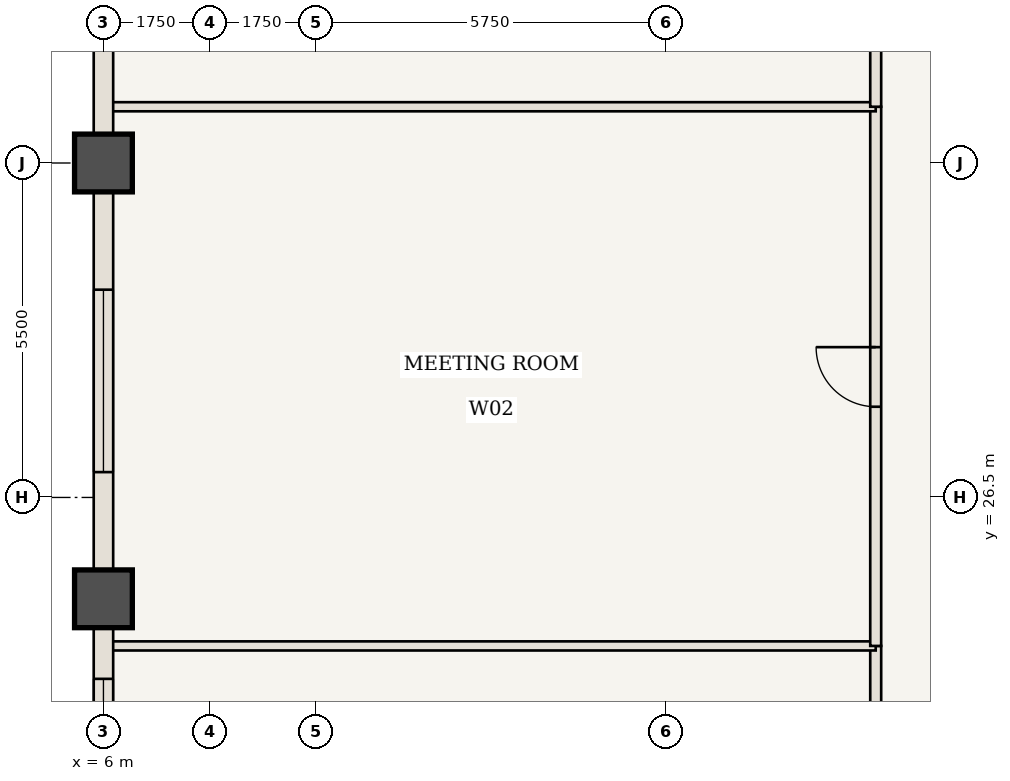
"""IFC4 building model, lengths in metres.
Left out: names, types, materials, properties, quantities, classifications, styles, units other than length and angle.
Written with IfcOpenShell. Run it as: python <this file> out.ifc"""

import sys

from ifc_helpers import new_model, si_unit, direction, frame, frame_2d, origin, origin_2d, place, context, subcontext, project, spatial, rectangle, extrude, element, fill, save


model = new_model("IFC4")
c1 = context("Model", 3, precision=1e-05, world=origin(), true_north=direction((0.0, 1.0)))
c2 = subcontext(c1, "Body", "Model", "MODEL_VIEW")
j1 = project(units=[si_unit("LENGTHUNIT", "METRE"), si_unit("PLANEANGLEUNIT", "RADIAN")], contexts=[c1])
p1 = place(None, origin())
s1 = spatial("IfcSite", under=j1, at=p1, CompositionType="ELEMENT")
p2 = place(p1, origin())
s2 = spatial("IfcBuilding", under=s1, at=p2, CompositionType="ELEMENT")
p3 = place(p2, frame((0.0, 0.0, 137.55)))
s3 = spatial("IfcBuildingStorey", under=s2, at=p3, CompositionType="ELEMENT", Elevation=137.55)
for number, where, z_axis, x_axis in (
    (1, (6.0, 24.833, 0.0), (0.0, 0.0, 1.0), (1.0, 0.0, 0.0)),
    (2, (6.0, 32.0, 0.0), (0.0, 0.0, 1.0), (1.0, 0.0, 0.0)),
):
    element("IfcColumn", number, at=place(p3, frame(where, z_axis=z_axis, x_axis=x_axis)), inside=s3, PredefinedType="COLUMN", context=c2, shape_type="SweptSolid", body=[
        extrude(rectangle(XDim=0.95, YDim=0.95, at=origin_2d()), origin(), (0.0, 0.0, 1.0), 3.85),
    ])
p4 = place(p3, frame((18.7, 20.7, 0.0), z_axis=(0.0, 0.0, 1.0), x_axis=(0.0, 1.0, 0.0)))
e3 = element("IfcWall", 3, at=p4, inside=s3, PredefinedType="STANDARD", context=c2, shape_type="SweptSolid", body=[
    extrude(rectangle(XDim=3.358, YDim=0.18, at=frame_2d((1.679, 0.0))), origin(), (0.0, 0.0, 1.0), 3.685),
])
p5 = place(p4, frame((1.179, 0.0, 0.0)))
e4 = element("IfcOpeningElement", 4, at=p5, cuts=e3, PredefinedType="OPENING", context=c2, shape_type="SweptSolid", body=[
    extrude(rectangle(XDim=0.98, YDim=2.2, at=frame_2d((0.49, 1.1))), frame((0.0, 0.1, 0.0), z_axis=(0.0, -1.0, 0.0), x_axis=(1.0, 0.0, 0.0)), (0.0, 0.0, 1.0), 0.2),
])
p6 = place(p3, frame((6.06, 24.058, 0.0), z_axis=(0.0, 0.0, 1.0), x_axis=(1.0, 0.0, 0.0)))
e5 = element("IfcWall", 5, at=p6, inside=s3, PredefinedType="STANDARD", context=c2, shape_type="SweptSolid", body=[
    extrude(rectangle(XDim=12.64, YDim=0.15, at=frame_2d((6.32, 0.0))), origin(), (0.0, 0.0, 1.0), 3.685),
])
p7 = place(p3, frame((18.7, 24.058, 0.0), z_axis=(0.0, 0.0, 1.0), x_axis=(0.0, 1.0, 0.0)))
e6 = element("IfcWall", 6, at=p7, inside=s3, PredefinedType="STANDARD", context=c2, shape_type="SweptSolid", body=[
    extrude(rectangle(XDim=8.867, YDim=0.18, at=frame_2d((4.433, 0.0))), origin(), (0.0, 0.0, 1.0), 3.685),
])
p8 = place(p7, frame((3.933, 0.0, 0.0)))
e7 = element("IfcOpeningElement", 7, at=p8, cuts=e6, PredefinedType="OPENING", context=c2, shape_type="SweptSolid", body=[
    extrude(rectangle(XDim=0.98, YDim=2.2, at=frame_2d((0.49, 1.1))), frame((0.0, 0.1, 0.0), z_axis=(0.0, -1.0, 0.0), x_axis=(1.0, 0.0, 0.0)), (0.0, 0.0, 1.0), 0.2),
])
p9 = place(p3, frame((6.06, 32.925, 0.0), z_axis=(0.0, 0.0, 1.0), x_axis=(1.0, 0.0, 0.0)))
e8 = element("IfcWall", 8, at=p9, inside=s3, PredefinedType="STANDARD", context=c2, shape_type="SweptSolid", body=[
    extrude(rectangle(XDim=12.64, YDim=0.15, at=frame_2d((6.32, 0.0))), origin(), (0.0, 0.0, 1.0), 3.685),
])
p10 = place(p3, frame((18.7, 32.925, 0.0), z_axis=(0.0, 0.0, 1.0), x_axis=(0.0, 1.0, 0.0)))
e9 = element("IfcWall", 9, at=p10, inside=s3, PredefinedType="STANDARD", context=c2, shape_type="SweptSolid", body=[
    extrude(rectangle(XDim=10.375, YDim=0.18, at=frame_2d((5.188, 0.0))), origin(), (0.0, 0.0, 1.0), 3.685),
])
p11 = place(p10, frame((4.688, 0.0, 0.0)))
e10 = element("IfcOpeningElement", 10, at=p11, cuts=e9, PredefinedType="OPENING", context=c2, shape_type="SweptSolid", body=[
    extrude(rectangle(XDim=0.98, YDim=2.2, at=frame_2d((0.49, 1.1))), frame((0.0, 0.1, 0.0), z_axis=(0.0, -1.0, 0.0), x_axis=(1.0, 0.0, 0.0)), (0.0, 0.0, 1.0), 0.2),
])
p12 = place(p3, frame((6.0, 17.667, 0.0), z_axis=(0.0, 0.0, 1.0), x_axis=(0.0, 1.0, 0.0)))
e11 = element("IfcWall", 11, at=p12, inside=s3, PredefinedType="USERDEFINED", context=c2, shape_type="SweptSolid", body=[
    extrude(rectangle(XDim=7.167, YDim=0.32, at=frame_2d((3.583, 0.0))), origin(), (0.0, 0.0, 1.0), 2.885),
])
p13 = place(p12, frame((0.879, 0.0, 0.85)))
e12 = element("IfcOpeningElement", 12, at=p13, cuts=e11, PredefinedType="OPENING", context=c2, shape_type="SweptSolid", body=[
    extrude(rectangle(XDim=1.6, YDim=1.835, at=frame_2d((0.8, 0.917))), frame((0.0, 0.17, 0.0), z_axis=(0.0, -1.0, 0.0), x_axis=(1.0, 0.0, 0.0)), (0.0, 0.0, 1.0), 0.34),
])
p14 = place(p12, frame((4.25, 0.0, 0.85)))
e13 = element("IfcOpeningElement", 13, at=p14, cuts=e11, PredefinedType="OPENING", context=c2, shape_type="SweptSolid", body=[
    extrude(rectangle(XDim=1.6, YDim=1.835, at=frame_2d((0.8, 0.917))), frame((0.0, 0.17, 0.0), z_axis=(0.0, -1.0, 0.0), x_axis=(1.0, 0.0, 0.0)), (0.0, 0.0, 1.0), 0.34),
])
p15 = place(p3, frame((6.0, 24.833, 0.0), z_axis=(0.0, 0.0, 1.0), x_axis=(0.0, 1.0, 0.0)))
e14 = element("IfcWall", 14, at=p15, inside=s3, PredefinedType="USERDEFINED", context=c2, shape_type="SweptSolid", body=[
    extrude(rectangle(XDim=7.167, YDim=0.32, at=frame_2d((3.583, 0.0))), origin(), (0.0, 0.0, 1.0), 2.885),
])
p16 = place(p15, frame((2.083, 0.0, 0.85)))
e15 = element("IfcOpeningElement", 15, at=p16, cuts=e14, PredefinedType="OPENING", context=c2, shape_type="SweptSolid", body=[
    extrude(rectangle(XDim=3.0, YDim=1.835, at=frame_2d((1.5, 0.917))), frame((0.0, 0.17, 0.0), z_axis=(0.0, -1.0, 0.0), x_axis=(1.0, 0.0, 0.0)), (0.0, 0.0, 1.0), 0.34),
])
p17 = place(p3, frame((6.0, 32.0, 0.0), z_axis=(0.0, 0.0, 1.0), x_axis=(0.0, 1.0, 0.0)))
e16 = element("IfcWall", 16, at=p17, inside=s3, PredefinedType="USERDEFINED", context=c2, shape_type="SweptSolid", body=[
    extrude(rectangle(XDim=7.167, YDim=0.32, at=frame_2d((3.583, 0.0))), origin(), (0.0, 0.0, 1.0), 2.885),
])
p18 = place(p17, frame((2.383, 0.0, 0.85)))
e17 = element("IfcOpeningElement", 17, at=p18, cuts=e16, PredefinedType="OPENING", context=c2, shape_type="SweptSolid", body=[
    extrude(rectangle(XDim=3.0, YDim=1.835, at=frame_2d((1.5, 0.917))), frame((0.0, 0.17, 0.0), z_axis=(0.0, -1.0, 0.0), x_axis=(1.0, 0.0, 0.0)), (0.0, 0.0, 1.0), 0.34),
])
p19 = place(p8, origin())
e18 = element("IfcDoor", 18, at=p19, inside=s3, OperationType="SINGLE_SWING_RIGHT", PredefinedType="DOOR", context=c2, shape_type="SweptSolid", body=[
    extrude(rectangle(XDim=0.98, YDim=2.2, at=frame_2d((0.49, 1.1))), frame((0.0, 0.025, 0.0), z_axis=(0.0, -1.0, 0.0), x_axis=(1.0, 0.0, 0.0)), (0.0, 0.0, 1.0), 0.05),
])
fill(e7, e18)
p20 = place(p14, origin())
e19 = element("IfcWindow", 19, at=p20, inside=s3, PartitioningType="SINGLE_PANEL", PredefinedType="WINDOW", context=c2, shape_type="SweptSolid", body=[
    extrude(rectangle(XDim=1.6, YDim=1.835, at=frame_2d((0.8, 0.917))), frame((0.0, 0.03, 0.0), z_axis=(0.0, -1.0, 0.0), x_axis=(1.0, 0.0, 0.0)), (0.0, 0.0, 1.0), 0.06),
])
fill(e13, e19)
p21 = place(p16, origin())
e20 = element("IfcWindow", 20, at=p21, inside=s3, PartitioningType="SINGLE_PANEL", PredefinedType="WINDOW", context=c2, shape_type="SweptSolid", body=[
    extrude(rectangle(XDim=3.0, YDim=1.835, at=frame_2d((1.5, 0.917))), frame((0.0, 0.03, 0.0), z_axis=(0.0, -1.0, 0.0), x_axis=(1.0, 0.0, 0.0)), (0.0, 0.0, 1.0), 0.06),
])
fill(e15, e20)
save(model, sys.argv[1])
